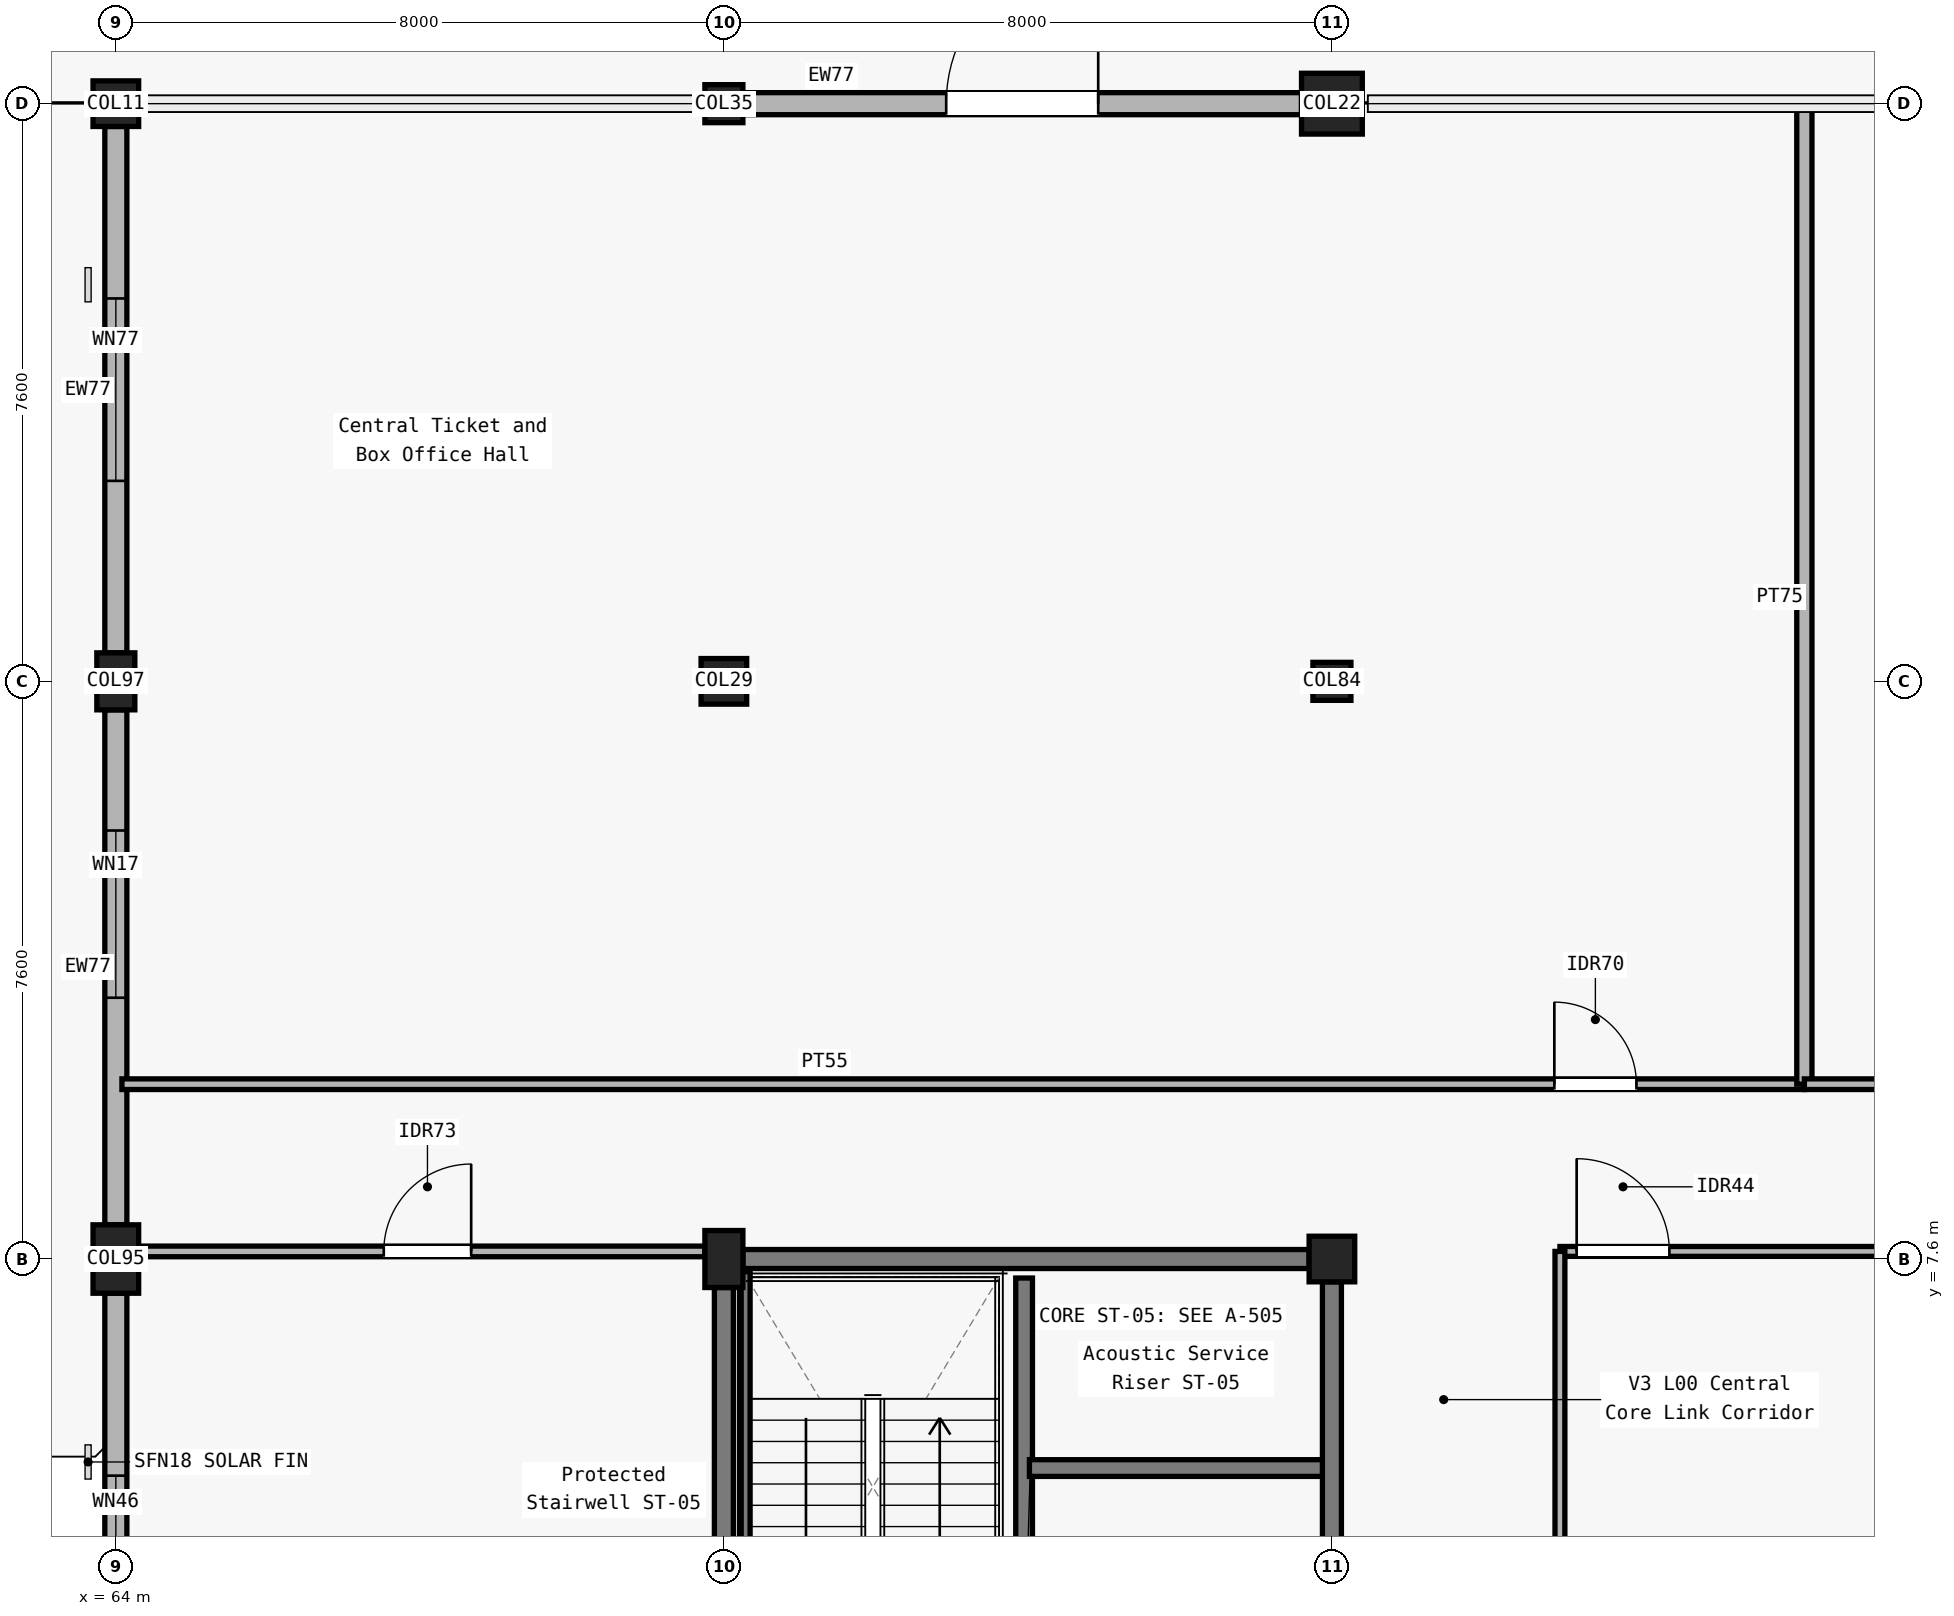
"""IFC4 building model, lengths in metres.
Left out: names, types, materials, properties, quantities, classifications, styles, units other than length and angle.
Written with IfcOpenShell. Run it as: python <this file> out.ifc"""

import sys

from ifc_helpers import new_model, si_unit, direction, frame, frame_2d, origin, origin_2d, place, context, subcontext, project, spatial, rectangle, circle, extrude, element, fill, save


model = new_model("IFC4")
c1 = context("Model", 3, precision=1e-05, world=origin(), true_north=direction((0.0, 1.0)))
c2 = subcontext(c1, "Body", "Model", "MODEL_VIEW")
j1 = project(units=[si_unit("LENGTHUNIT", "METRE"), si_unit("PLANEANGLEUNIT", "RADIAN")], contexts=[c1])
p1 = place(None, origin())
s1 = spatial("IfcSite", under=j1, at=p1, CompositionType="ELEMENT")
p2 = place(p1, origin())
s2 = spatial("IfcBuilding", under=s1, at=p2, CompositionType="ELEMENT")
p3 = place(p2, origin())
s3 = spatial("IfcBuildingStorey", under=s2, at=p3, CompositionType="ELEMENT", Elevation=0.0)
p4 = place(p3, frame((64.0, 7.6, 0.0), z_axis=(0.0, 0.0, 1.0), x_axis=(1.0, 0.0, 0.0)))
e1 = element("IfcColumn", 1, at=p4, inside=s3, PredefinedType="COLUMN", context=c2, shape_type="SweptSolid", body=[
    extrude(rectangle(XDim=0.6, YDim=0.9, at=origin_2d()), origin(), (0.0, 0.0, 1.0), 5.4),
])
p5 = place(p3, frame((64.0, 15.2, 0.0), z_axis=(0.0, 0.0, 1.0), x_axis=(1.0, 0.0, 0.0)))
e2 = element("IfcColumn", 2, at=p5, inside=s3, PredefinedType="COLUMN", context=c2, shape_type="SweptSolid", body=[
    extrude(rectangle(XDim=0.5, YDim=0.75, at=origin_2d()), origin(), (0.0, 0.0, 1.0), 5.4),
])
p6 = place(p3, frame((64.0, 22.8, 0.0), z_axis=(0.0, 0.0, 1.0), x_axis=(1.0, 0.0, 0.0)))
e3 = element("IfcColumn", 3, at=p6, inside=s3, PredefinedType="COLUMN", context=c2, shape_type="SweptSolid", body=[
    extrude(rectangle(XDim=0.6, YDim=0.6, at=origin_2d()), origin(), (0.0, 0.0, 1.0), 5.4),
])
p7 = place(p3, frame((72.0, 7.6, 0.0), z_axis=(0.0, 0.0, 1.0), x_axis=(1.0, 0.0, 0.0)))
e4 = element("IfcColumn", 4, at=p7, inside=s3, PredefinedType="COLUMN", context=c2, shape_type="SweptSolid", body=[
    extrude(rectangle(XDim=0.5, YDim=0.75, at=origin_2d()), origin(), (0.0, 0.0, 1.0), 5.4),
])
p8 = place(p3, frame((72.0, 15.2, 0.0), z_axis=(0.0, 0.0, 1.0), x_axis=(1.0, 0.0, 0.0)))
e5 = element("IfcColumn", 5, at=p8, inside=s3, PredefinedType="COLUMN", context=c2, shape_type="SweptSolid", body=[
    extrude(rectangle(XDim=0.6, YDim=0.6, at=origin_2d()), origin(), (0.0, 0.0, 1.0), 5.4),
])
p9 = place(p3, frame((72.0, 22.8, 0.0), z_axis=(0.0, 0.0, 1.0), x_axis=(1.0, 0.0, 0.0)))
e6 = element("IfcColumn", 6, at=p9, inside=s3, PredefinedType="COLUMN", context=c2, shape_type="SweptSolid", body=[
    extrude(rectangle(XDim=0.5, YDim=0.5, at=origin_2d()), origin(), (0.0, 0.0, 1.0), 5.4),
])
p10 = place(p3, frame((80.0, 7.6, 0.0), z_axis=(0.0, 0.0, 1.0), x_axis=(1.0, 0.0, 0.0)))
e7 = element("IfcColumn", 7, at=p10, inside=s3, PredefinedType="COLUMN", context=c2, shape_type="SweptSolid", body=[
    extrude(rectangle(XDim=0.6, YDim=0.6, at=origin_2d()), origin(), (0.0, 0.0, 1.0), 5.4),
])
p11 = place(p3, frame((80.0, 15.2, 0.0), z_axis=(0.0, 0.0, 1.0), x_axis=(1.0, 0.0, 0.0)))
e8 = element("IfcColumn", 8, at=p11, inside=s3, PredefinedType="COLUMN", context=c2, shape_type="SweptSolid", body=[
    extrude(rectangle(XDim=0.5, YDim=0.5, at=origin_2d()), origin(), (0.0, 0.0, 1.0), 5.4),
])
p12 = place(p3, frame((80.0, 22.8, 0.0), z_axis=(0.0, 0.0, 1.0), x_axis=(1.0, 0.0, 0.0)))
e9 = element("IfcColumn", 9, at=p12, inside=s3, PredefinedType="COLUMN", context=c2, shape_type="SweptSolid", body=[
    extrude(circle(Radius=0.4, at=origin_2d()), origin(), (0.0, 0.0, 1.0), 5.4),
])
p13 = place(p3, frame((64.0, 0.35, 0.0), z_axis=(0.0, 0.0, 1.0), x_axis=(0.0, 1.0, 0.0)))
e10 = element("IfcWall", 10, at=p13, inside=s3, PredefinedType="SOLIDWALL", context=c2, shape_type="SweptSolid", body=[
    extrude(rectangle(XDim=6.8, YDim=0.29, at=frame_2d((3.4, 0.0))), origin(), (0.0, 0.0, 1.0), 4.73),
])
p14 = place(p13, frame((2.4, 0.0, 0.95)))
e11 = element("IfcOpeningElement", 11, at=p14, cuts=e10, PredefinedType="OPENING", context=c2, shape_type="SweptSolid", body=[
    extrude(rectangle(XDim=2.0, YDim=1.95, at=frame_2d((1.0, 0.975))), frame((0.0, 0.155, 0.0), z_axis=(0.0, -1.0, 0.0), x_axis=(1.0, 0.0, 0.0)), (0.0, 0.0, 1.0), 0.31),
])
p15 = place(p3, frame((64.0, 8.05, 0.0), z_axis=(0.0, 0.0, 1.0), x_axis=(0.0, 1.0, 0.0)))
e12 = element("IfcWall", 12, at=p15, inside=s3, PredefinedType="SOLIDWALL", context=c2, shape_type="SweptSolid", body=[
    extrude(rectangle(XDim=6.775, YDim=0.29, at=frame_2d((3.387, 0.0))), origin(), (0.0, 0.0, 1.0), 4.49),
])
p16 = place(p15, frame((2.988, 0.0, 0.95)))
e13 = element("IfcOpeningElement", 13, at=p16, cuts=e12, PredefinedType="OPENING", context=c2, shape_type="SweptSolid", body=[
    extrude(rectangle(XDim=2.2, YDim=1.95, at=frame_2d((1.1, 0.975))), frame((0.0, 0.155, 0.0), z_axis=(0.0, -1.0, 0.0), x_axis=(1.0, 0.0, 0.0)), (0.0, 0.0, 1.0), 0.31),
])
p17 = place(p3, frame((64.0, 15.575, 0.0), z_axis=(0.0, 0.0, 1.0), x_axis=(0.0, 1.0, 0.0)))
e14 = element("IfcWall", 14, at=p17, inside=s3, PredefinedType="SOLIDWALL", context=c2, shape_type="SweptSolid", body=[
    extrude(rectangle(XDim=6.925, YDim=0.29, at=frame_2d((3.462, 0.0))), origin(), (0.0, 0.0, 1.0), 4.8),
])
p18 = place(p17, frame((2.262, 0.0, 0.95)))
e15 = element("IfcOpeningElement", 15, at=p18, cuts=e14, PredefinedType="OPENING", context=c2, shape_type="SweptSolid", body=[
    extrude(rectangle(XDim=2.4, YDim=1.95, at=frame_2d((1.2, 0.975))), frame((0.0, 0.155, 0.0), z_axis=(0.0, -1.0, 0.0), x_axis=(1.0, 0.0, 0.0)), (0.0, 0.0, 1.0), 0.31),
])
p19 = place(p3, frame((72.25, 22.8, 0.0), z_axis=(0.0, 0.0, 1.0), x_axis=(1.0, 0.0, 0.0)))
e16 = element("IfcWall", 16, at=p19, inside=s3, PredefinedType="SOLIDWALL", context=c2, shape_type="SweptSolid", body=[
    extrude(rectangle(XDim=7.35, YDim=0.29, at=frame_2d((3.675, 0.0))), origin(), (0.0, 0.0, 1.0), 4.8),
])
p20 = place(p19, frame((2.675, 0.0, 0.0)))
e17 = element("IfcOpeningElement", 17, at=p20, cuts=e16, PredefinedType="OPENING", context=c2, shape_type="SweptSolid", body=[
    extrude(rectangle(XDim=2.0, YDim=2.25, at=frame_2d((1.0, 1.125))), frame((0.0, 0.155, 0.0), z_axis=(0.0, -1.0, 0.0), x_axis=(1.0, 0.0, 0.0)), (0.0, 0.0, 1.0), 0.31),
])
p21 = place(p3, frame((72.0, 0.45, 0.0), z_axis=(0.0, 0.0, 1.0), x_axis=(0.0, 1.0, 0.0)))
e18 = element("IfcWall", 18, at=p21, inside=s3, PredefinedType="SOLIDWALL", context=c2, shape_type="SweptSolid", body=[
    extrude(rectangle(XDim=6.775, YDim=0.25, at=frame_2d((3.388, 0.0))), origin(), (0.0, 0.0, 1.0), 3.29),
])
p22 = place(p3, frame((72.25, 7.6, 0.0), z_axis=(0.0, 0.0, 1.0), x_axis=(1.0, 0.0, 0.0)))
e19 = element("IfcWall", 19, at=p22, inside=s3, PredefinedType="SOLIDWALL", context=c2, shape_type="SweptSolid", body=[
    extrude(rectangle(XDim=7.45, YDim=0.25, at=frame_2d((3.725, 0.0))), origin(), (0.0, 0.0, 1.0), 3.29),
])
p23 = place(p3, frame((75.95, 0.25, 0.0), z_axis=(0.0, 0.0, 1.0), x_axis=(0.0, 1.0, 0.0)))
e20 = element("IfcWall", 20, at=p23, inside=s3, PredefinedType="SOLIDWALL", context=c2, shape_type="SweptSolid", body=[
    extrude(rectangle(XDim=7.1, YDim=0.22, at=frame_2d((3.55, 0.0))), origin(), (0.0, 0.0, 1.0), 5.1),
])
p24 = place(p23, frame((0.35, 0.0, 0.0)))
e21 = element("IfcOpeningElement", 21, at=p24, cuts=e20, PredefinedType="OPENING", context=c2, shape_type="SweptSolid", body=[
    extrude(rectangle(XDim=1.2, YDim=2.15, at=frame_2d((0.6, 1.075))), frame((0.0, 0.12, 0.0), z_axis=(0.0, -1.0, 0.0), x_axis=(1.0, 0.0, 0.0)), (0.0, 0.0, 1.0), 0.24),
])
p25 = place(p3, frame((76.02, 4.85, 0.0), z_axis=(0.0, 0.0, 1.0), x_axis=(1.0, 0.0, 0.0)))
e22 = element("IfcWall", 22, at=p25, inside=s3, PredefinedType="SOLIDWALL", context=c2, shape_type="SweptSolid", body=[
    extrude(rectangle(XDim=3.93, YDim=0.22, at=frame_2d((1.965, 0.0))), origin(), (0.0, 0.0, 1.0), 4.455),
])
p26 = place(p3, frame((80.0, 0.375, 0.0), z_axis=(0.0, 0.0, 1.0), x_axis=(0.0, 1.0, 0.0)))
e23 = element("IfcWall", 23, at=p26, inside=s3, PredefinedType="SOLIDWALL", context=c2, shape_type="SweptSolid", body=[
    extrude(rectangle(XDim=6.925, YDim=0.25, at=frame_2d((3.462, 0.0))), origin(), (0.0, 0.0, 1.0), 4.35),
])
p27 = place(p26, frame((1.975, 0.0, 0.0)))
e24 = element("IfcOpeningElement", 24, at=p27, cuts=e23, PredefinedType="OPENING", context=c2, shape_type="SweptSolid", body=[
    extrude(rectangle(XDim=1.35, YDim=2.2, at=frame_2d((0.675, 1.1))), frame((0.0, 0.135, 0.0), z_axis=(0.0, -1.0, 0.0), x_axis=(1.0, 0.0, 0.0)), (0.0, 0.0, 1.0), 0.27),
])
p28 = place(p3, frame((64.08, 9.9, 0.0), z_axis=(0.0, 0.0, 1.0), x_axis=(1.0, 0.0, 0.0)))
e25 = element("IfcWall", 25, at=p28, inside=s3, PredefinedType="PARTITIONING", context=c2, shape_type="SweptSolid", body=[
    extrude(rectangle(XDim=22.136, YDim=0.14, at=frame_2d((11.068, 0.0))), origin(), (0.0, 0.0, 1.0), 4.35),
])
p29 = place(p28, frame((18.846, 0.0, 0.0)))
e26 = element("IfcOpeningElement", 26, at=p29, cuts=e25, PredefinedType="OPENING", context=c2, shape_type="SweptSolid", body=[
    extrude(rectangle(XDim=1.08, YDim=2.1, at=frame_2d((0.54, 1.05))), frame((0.0, 0.08, 0.0), z_axis=(0.0, -1.0, 0.0), x_axis=(1.0, 0.0, 0.0)), (0.0, 0.0, 1.0), 0.16),
])
p30 = place(p3, frame((86.216, 9.9, 0.0), z_axis=(0.0, 0.0, 1.0), x_axis=(0.0, 1.0, 0.0)))
e27 = element("IfcWall", 27, at=p30, inside=s3, PredefinedType="PARTITIONING", context=c2, shape_type="SweptSolid", body=[
    extrude(rectangle(XDim=12.82, YDim=0.2, at=frame_2d((6.41, 0.0))), origin(), (0.0, 0.0, 1.0), 4.495),
])
p31 = place(p3, frame((86.216, 9.9, 0.0), z_axis=(0.0, 0.0, 1.0), x_axis=(1.0, 0.0, 0.0)))
e28 = element("IfcWall", 28, at=p31, inside=s3, PredefinedType="PARTITIONING", context=c2, shape_type="SweptSolid", body=[
    extrude(rectangle(XDim=18.111, YDim=0.14, at=frame_2d((9.055, 0.0))), origin(), (0.0, 0.0, 1.0), 4.275),
])
p32 = place(p31, frame((5.221, 0.0, 0.0)))
e29 = element("IfcOpeningElement", 29, at=p32, cuts=e28, PredefinedType="OPENING", context=c2, shape_type="SweptSolid", body=[
    extrude(rectangle(XDim=0.92, YDim=2.15, at=frame_2d((0.46, 1.075))), frame((0.0, 0.08, 0.0), z_axis=(0.0, -1.0, 0.0), x_axis=(1.0, 0.0, 0.0)), (0.0, 0.0, 1.0), 0.16),
])
p33 = place(p3, frame((64.3, 7.7, 0.0), z_axis=(0.0, 0.0, 1.0), x_axis=(1.0, 0.0, 0.0)))
e30 = element("IfcWall", 30, at=p33, inside=s3, PredefinedType="PARTITIONING", context=c2, shape_type="SweptSolid", body=[
    extrude(rectangle(XDim=7.45, YDim=0.14, at=frame_2d((3.725, 0.0))), origin(), (0.0, 0.0, 1.0), 3.29),
])
p34 = place(p33, frame((3.225, 0.0, 0.0)))
e31 = element("IfcOpeningElement", 31, at=p34, cuts=e30, PredefinedType="OPENING", context=c2, shape_type="SweptSolid", body=[
    extrude(rectangle(XDim=1.15, YDim=2.15, at=frame_2d((0.575, 1.075))), frame((0.0, 0.08, 0.0), z_axis=(0.0, -1.0, 0.0), x_axis=(1.0, 0.0, 0.0)), (0.0, 0.0, 1.0), 0.16),
])
p35 = place(p3, frame((83.0, 7.7, 0.0), z_axis=(0.0, 0.0, 1.0), x_axis=(1.0, 0.0, 0.0)))
e32 = element("IfcWall", 32, at=p35, inside=s3, PredefinedType="PARTITIONING", context=c2, shape_type="SweptSolid", body=[
    extrude(rectangle(XDim=20.675, YDim=0.13, at=frame_2d((10.337, 0.0))), origin(), (0.0, 0.0, 1.0), 4.14),
])
p36 = place(p35, frame((0.22, 0.0, 0.0)))
e33 = element("IfcOpeningElement", 33, at=p36, cuts=e32, PredefinedType="OPENING", context=c2, shape_type="SweptSolid", body=[
    extrude(rectangle(XDim=1.22, YDim=2.15, at=frame_2d((0.61, 1.075))), frame((0.0, 0.075, 0.0), z_axis=(0.0, -1.0, 0.0), x_axis=(1.0, 0.0, 0.0)), (0.0, 0.0, 1.0), 0.15),
])
p37 = place(p3, frame((83.0, 0.08, 0.0), z_axis=(0.0, 0.0, 1.0), x_axis=(0.0, 1.0, 0.0)))
e34 = element("IfcWall", 34, at=p37, inside=s3, PredefinedType="PARTITIONING", context=c2, shape_type="SweptSolid", body=[
    extrude(rectangle(XDim=7.62, YDim=0.13, at=frame_2d((3.81, 0.0))), origin(), (0.0, 0.0, 1.0), 4.35),
])
p38 = place(p3, frame((72.275, 0.15, 0.0), z_axis=(0.0, 0.0, 1.0), x_axis=(0.0, 1.0, 0.0)))
e35 = element("IfcWall", 35, at=p38, inside=s3, PredefinedType="SOLIDWALL", context=c2, shape_type="SweptSolid", body=[
    extrude(rectangle(XDim=7.3, YDim=0.14, at=frame_2d((3.65, 0.0))), origin(), (0.0, 0.0, 1.0), 5.1),
])
p39 = place(p14, origin())
e36 = element("IfcWindow", 36, at=p39, inside=s3, PartitioningType="DOUBLE_PANEL_VERTICAL", PredefinedType="WINDOW", context=c2, shape_type="SweptSolid", body=[
    extrude(rectangle(XDim=2.0, YDim=1.95, at=frame_2d((1.0, 0.975))), frame((0.0, 0.03, 0.0), z_axis=(0.0, -1.0, 0.0), x_axis=(1.0, 0.0, 0.0)), (0.0, 0.0, 1.0), 0.06),
])
fill(e11, e36)
p40 = place(p16, origin())
e37 = element("IfcWindow", 37, at=p40, inside=s3, PartitioningType="DOUBLE_PANEL_VERTICAL", PredefinedType="WINDOW", context=c2, shape_type="SweptSolid", body=[
    extrude(rectangle(XDim=2.2, YDim=1.95, at=frame_2d((1.1, 0.975))), frame((0.0, 0.03, 0.0), z_axis=(0.0, -1.0, 0.0), x_axis=(1.0, 0.0, 0.0)), (0.0, 0.0, 1.0), 0.06),
])
fill(e13, e37)
p41 = place(p18, origin())
e38 = element("IfcWindow", 38, at=p41, inside=s3, PartitioningType="DOUBLE_PANEL_VERTICAL", PredefinedType="WINDOW", context=c2, shape_type="SweptSolid", body=[
    extrude(rectangle(XDim=2.4, YDim=1.95, at=frame_2d((1.2, 0.975))), frame((0.0, 0.03, 0.0), z_axis=(0.0, -1.0, 0.0), x_axis=(1.0, 0.0, 0.0)), (0.0, 0.0, 1.0), 0.06),
])
fill(e15, e38)
p42 = place(p20, origin())
e39 = element("IfcDoor", 39, at=p42, inside=s3, OperationType="SINGLE_SWING_RIGHT", PredefinedType="DOOR", context=c2, shape_type="SweptSolid", body=[
    extrude(rectangle(XDim=2.0, YDim=2.25, at=frame_2d((1.0, 1.125))), frame((0.0, 0.025, 0.0), z_axis=(0.0, -1.0, 0.0), x_axis=(1.0, 0.0, 0.0)), (0.0, 0.0, 1.0), 0.05),
])
fill(e17, e39)
p43 = place(p29, origin())
e40 = element("IfcDoor", 40, at=p43, inside=s3, OperationType="SINGLE_SWING_LEFT", PredefinedType="DOOR", context=c2, shape_type="SweptSolid", body=[
    extrude(rectangle(XDim=1.08, YDim=2.1, at=frame_2d((0.54, 1.05))), frame((0.0, 0.025, 0.0), z_axis=(0.0, -1.0, 0.0), x_axis=(1.0, 0.0, 0.0)), (0.0, 0.0, 1.0), 0.05),
])
fill(e26, e40)
p44 = place(p34, origin())
e41 = element("IfcDoor", 41, at=p44, inside=s3, OperationType="SINGLE_SWING_RIGHT", PredefinedType="DOOR", context=c2, shape_type="SweptSolid", body=[
    extrude(rectangle(XDim=1.15, YDim=2.15, at=frame_2d((0.575, 1.075))), frame((0.0, 0.025, 0.0), z_axis=(0.0, -1.0, 0.0), x_axis=(1.0, 0.0, 0.0)), (0.0, 0.0, 1.0), 0.05),
])
fill(e31, e41)
p45 = place(p36, origin())
e42 = element("IfcDoor", 42, at=p45, inside=s3, OperationType="SINGLE_SWING_LEFT", PredefinedType="DOOR", context=c2, shape_type="SweptSolid", body=[
    extrude(rectangle(XDim=1.22, YDim=2.15, at=frame_2d((0.61, 1.075))), frame((0.0, 0.025, 0.0), z_axis=(0.0, -1.0, 0.0), x_axis=(1.0, 0.0, 0.0)), (0.0, 0.0, 1.0), 0.05),
])
fill(e33, e42)
save(model, sys.argv[1])
